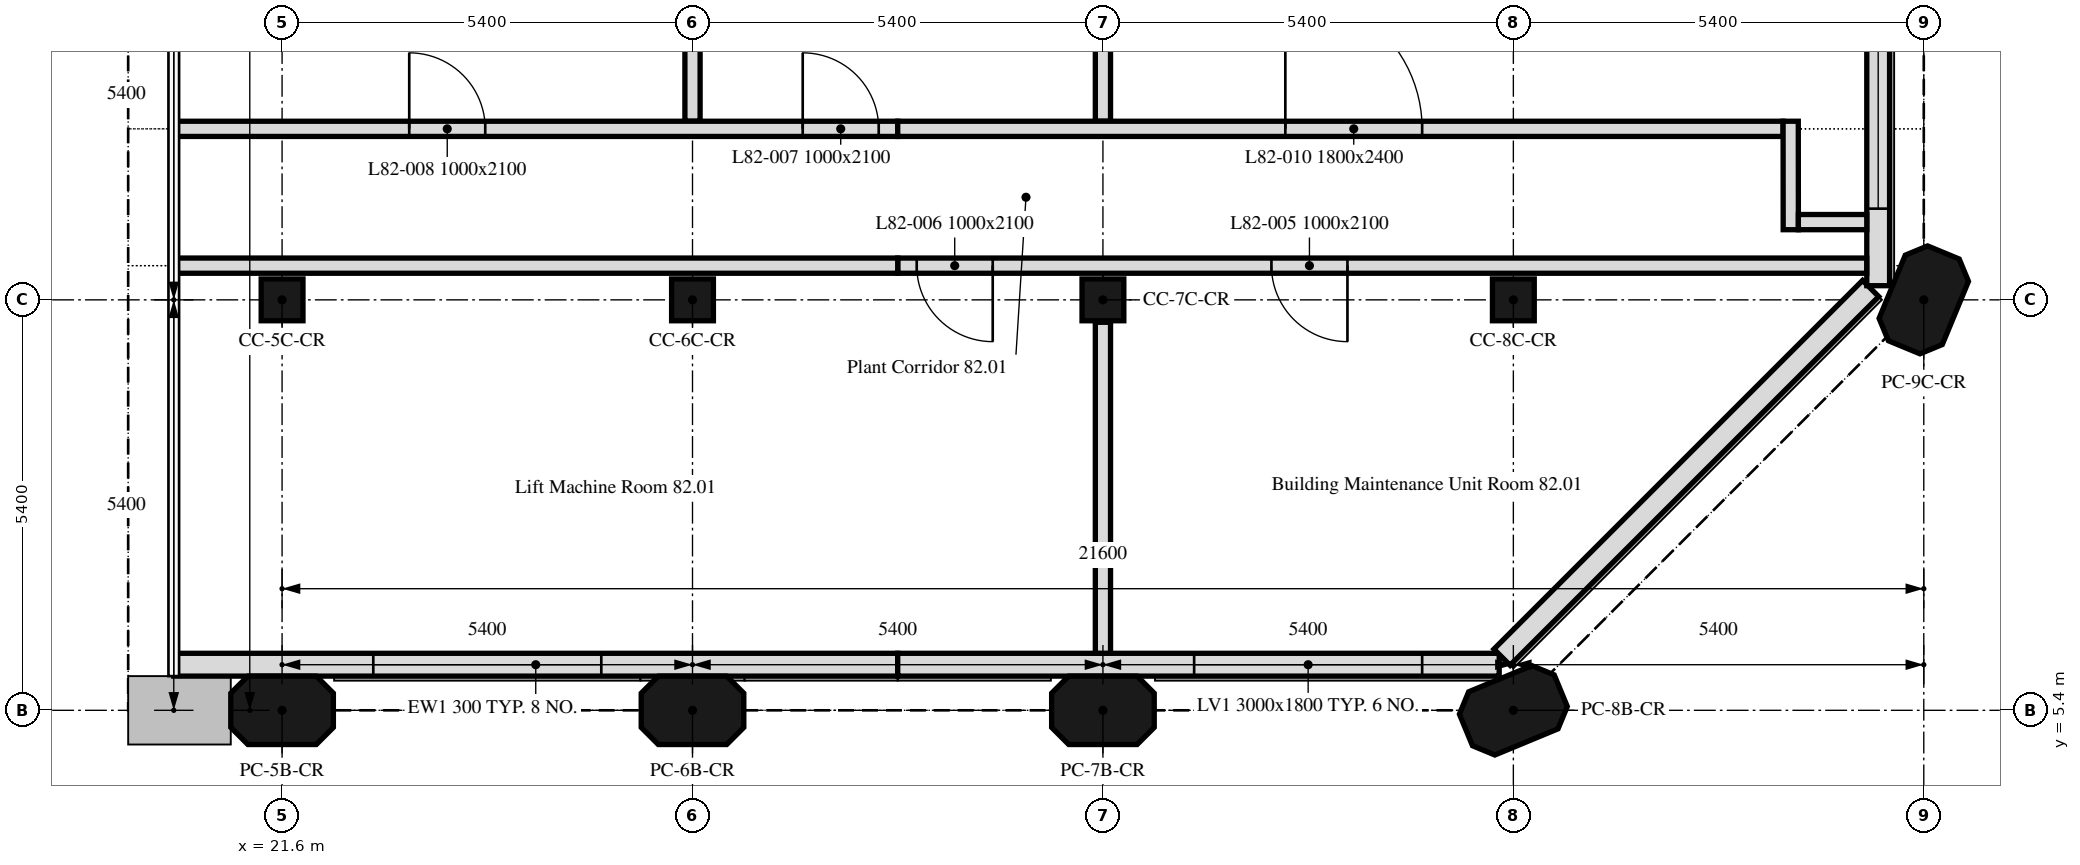
"""IFC4 building model, lengths in metres.
Left out: names, types, materials, properties, quantities, classifications, styles, units other than length and angle.
Written with IfcOpenShell. Run it as: python <this file> out.ifc"""

import sys

from ifc_helpers import new_model, si_unit, direction, frame, frame_2d, origin, origin_2d, place, context, subcontext, project, spatial, polyline, rectangle, outline, extrude, element, fill, save


model = new_model("IFC4")
c1 = context("Model", 3, precision=1e-05, world=origin(), true_north=direction((0.0, 1.0)))
c2 = subcontext(c1, "Body", "Model", "MODEL_VIEW")
j1 = project(units=[si_unit("LENGTHUNIT", "METRE"), si_unit("PLANEANGLEUNIT", "RADIAN")], contexts=[c1])
p1 = place(None, origin())
s1 = spatial("IfcSite", under=j1, at=p1, CompositionType="ELEMENT")
p2 = place(p1, origin())
s2 = spatial("IfcBuilding", under=s1, at=p2, CompositionType="ELEMENT")
p3 = place(p2, frame((0.0, 0.0, 330.7)))
s3 = spatial("IfcBuildingStorey", under=s2, at=p3, CompositionType="ELEMENT", Elevation=330.7)
p4 = place(p3, frame((21.6, 5.4, 0.0), z_axis=(0.0, 0.0, 1.0), x_axis=(1.0, 0.0, 0.0)))
e1 = element("IfcColumn", 1, at=p4, inside=s3, PredefinedType="COLUMN", context=c2, shape_type="SweptSolid", body=[
    extrude(outline(polyline([(-0.45, -0.45), (0.45, -0.45), (0.675, -0.225), (0.675, 0.225), (0.45, 0.45), (-0.45, 0.45), (-0.675, 0.225), (-0.675, -0.225), (-0.45, -0.45)])), origin(), (0.0, 0.0, 1.0), 3.6),
])
for number, where, z_axis, x_axis in (
    (2, (27.0, 5.4, 0.0), (0.0, 0.0, 1.0), (1.0, 0.0, 0.0)),
    (3, (32.4, 5.4, 0.0), (0.0, 0.0, 1.0), (1.0, 0.0, 0.0)),
    (4, (37.8, 5.4, 0.0), (0.0, 0.0, 1.0), (0.924, 0.383, 0.0)),
):
    element("IfcColumn", number, at=place(p3, frame(where, z_axis=z_axis, x_axis=x_axis)), inside=s3, PredefinedType="COLUMN", context=c2, shape_type="SweptSolid", body=[
        extrude(outline(polyline([(-0.45, -0.45), (0.45, -0.45), (0.675, -0.225), (0.675, 0.225), (0.45, 0.45), (-0.45, 0.45), (-0.675, 0.225), (-0.675, -0.225), (-0.45, -0.45)])), origin(), (0.0, 0.0, 1.0), 4.2),
    ])
p5 = place(p3, frame((21.6, 10.8, 0.0), z_axis=(0.0, 0.0, 1.0), x_axis=(1.0, 0.0, 0.0)))
e5 = element("IfcColumn", 5, at=p5, inside=s3, PredefinedType="COLUMN", context=c2, shape_type="SweptSolid", body=[
    extrude(rectangle(XDim=0.55, YDim=0.55, at=origin_2d()), origin(), (0.0, 0.0, 1.0), 3.6),
])
for number, where, z_axis, x_axis in (
    (6, (27.0, 10.8, 0.0), (0.0, 0.0, 1.0), (1.0, 0.0, 0.0)),
    (7, (32.4, 10.8, 0.0), (0.0, 0.0, 1.0), (1.0, 0.0, 0.0)),
    (8, (37.8, 10.8, 0.0), (0.0, 0.0, 1.0), (1.0, 0.0, 0.0)),
):
    element("IfcColumn", number, at=place(p3, frame(where, z_axis=z_axis, x_axis=x_axis)), inside=s3, PredefinedType="COLUMN", context=c2, shape_type="SweptSolid", body=[
        extrude(rectangle(XDim=0.55, YDim=0.55, at=origin_2d()), origin(), (0.0, 0.0, 1.0), 4.2),
    ])
p6 = place(p3, frame((43.2, 10.8, 0.0), z_axis=(0.0, 0.0, 1.0), x_axis=(0.382683432365, 0.923879532511, 0.0)))
e9 = element("IfcColumn", 9, at=p6, inside=s3, PredefinedType="COLUMN", context=c2, shape_type="SweptSolid", body=[
    extrude(outline(polyline([(-0.45, -0.45), (0.45, -0.45), (0.675, -0.225), (0.675, 0.225), (0.45, 0.45), (-0.45, 0.45), (-0.675, 0.225), (-0.675, -0.225), (-0.45, -0.45)])), origin(), (0.0, 0.0, 1.0), 4.2),
])
p7 = place(p3, frame((20.175, 6.0, 0.0), z_axis=(0.0, 0.0, 1.0), x_axis=(1.0, 0.0, 0.0)))
e10 = element("IfcWall", 10, at=p7, inside=s3, PredefinedType="SOLIDWALL", context=c2, shape_type="SweptSolid", body=[
    extrude(outline(polyline([(0.0, 0.0), (9.525, 0.0), (9.525, 4.2), (8.93, 6.936), (8.334, 6.671), (7.739, 6.406), (7.144, 6.142), (6.548, 5.877), (5.953, 5.613), (5.358, 5.348), (4.762, 5.083), (4.167, 4.819), (3.572, 4.554), (2.977, 4.29), (2.381, 4.025), (1.786, 3.76), (1.191, 3.496), (0.595, 3.231), (0.0, 2.967), (0.0, 0.0)])), frame((0.0, 0.15, 0.0), z_axis=(0.0, -1.0, 0.0), x_axis=(1.0, 0.0, 0.0)), (0.0, 0.0, 1.0), 0.3),
])
p8 = place(p7, frame((2.625, 0.0, 0.6)))
e11 = element("IfcOpeningElement", 11, at=p8, cuts=e10, PredefinedType="OPENING", context=c2, shape_type="SweptSolid", body=[
    extrude(rectangle(XDim=3.0, YDim=1.8, at=frame_2d((1.5, 0.9))), frame((0.0, 0.16, 0.0), z_axis=(0.0, -1.0, 0.0), x_axis=(1.0, 0.0, 0.0)), (0.0, 0.0, 1.0), 0.32),
])
p9 = place(p3, frame((29.7, 6.0, 0.0), z_axis=(0.0, 0.0, 1.0), x_axis=(1.0, 0.0, 0.0)))
e12 = element("IfcWall", 12, at=p9, inside=s3, PredefinedType="SOLIDWALL", context=c2, shape_type="SweptSolid", body=[
    extrude(outline(polyline([(0.0, 0.0), (7.914, 0.0), (7.914, 4.2), (7.348, 4.2), (6.783, 4.2), (6.218, 4.2), (5.653, 4.2), (5.087, 4.2), (4.522, 4.2), (3.957, 4.2), (3.392, 4.2), (2.826, 4.2), (2.261, 4.2), (1.696, 4.2), (1.131, 4.2), (0.565, 4.2), (0.0, 4.2), (0.0, 0.0)])), frame((0.0, 0.15, 0.0), z_axis=(0.0, -1.0, 0.0), x_axis=(1.0, 0.0, 0.0)), (0.0, 0.0, 1.0), 0.3),
])
p10 = place(p9, frame((3.9, 0.0, 0.6)))
e13 = element("IfcOpeningElement", 13, at=p10, cuts=e12, PredefinedType="OPENING", context=c2, shape_type="SweptSolid", body=[
    extrude(rectangle(XDim=3.0, YDim=1.8, at=frame_2d((1.5, 0.9))), frame((0.0, 0.16, 0.0), z_axis=(0.0, -1.0, 0.0), x_axis=(1.0, 0.0, 0.0)), (0.0, 0.0, 1.0), 0.32),
])
p11 = place(p3, frame((37.65, 6.099, 0.0), z_axis=(0.0, 0.0, 1.0), x_axis=(0.707106781187, 0.707106781187, 0.0)))
e14 = element("IfcWall", 14, at=p11, inside=s3, PredefinedType="SOLIDWALL", context=c2, shape_type="SweptSolid", body=[
    extrude(outline(polyline([(0.0, 0.0), (6.86, 0.0), (6.86, 4.2), (6.288, 4.2), (5.716, 4.2), (5.145, 4.2), (4.573, 4.2), (4.001, 4.2), (3.43, 4.2), (2.858, 4.2), (2.287, 4.2), (1.715, 4.2), (1.143, 4.2), (0.572, 4.2), (0.0, 4.2), (0.0, 0.0)])), frame((0.0, 0.15, 0.0), z_axis=(0.0, -1.0, 0.0), x_axis=(1.0, 0.0, 0.0)), (0.0, 0.0, 1.0), 0.3),
])
p12 = place(p3, frame((42.6, 10.986, 0.0), z_axis=(0.0, 0.0, 1.0), x_axis=(0.0, 1.0, 0.0)))
e15 = element("IfcWall", 15, at=p12, inside=s3, PredefinedType="SOLIDWALL", context=c2, shape_type="SweptSolid", body=[
    extrude(outline(polyline([(0.0, 0.0), (5.214, 0.0), (5.214, 4.2), (4.634, 4.2), (4.055, 4.2), (3.476, 4.2), (2.896, 4.2), (2.317, 4.2), (1.738, 4.2), (1.159, 4.2), (0.579, 4.2), (0.0, 4.2), (0.0, 0.0)])), frame((0.0, 0.15, 0.0), z_axis=(0.0, -1.0, 0.0), x_axis=(1.0, 0.0, 0.0)), (0.0, 0.0, 1.0), 0.3),
])
p13 = place(p12, frame((1.014, 0.0, 0.6)))
e16 = element("IfcOpeningElement", 16, at=p13, cuts=e15, PredefinedType="OPENING", context=c2, shape_type="SweptSolid", body=[
    extrude(rectangle(XDim=3.0, YDim=1.8, at=frame_2d((1.5, 0.9))), frame((0.0, 0.16, 0.0), z_axis=(0.0, -1.0, 0.0), x_axis=(1.0, 0.0, 0.0)), (0.0, 0.0, 1.0), 0.32),
])
p14 = place(p3, frame((32.4, 10.505, 0.0), z_axis=(0.0, 0.0, 1.0), x_axis=(0.0, -1.0, 0.0)))
e17 = element("IfcWall", 17, at=p14, inside=s3, PredefinedType="PARTITIONING", context=c2, shape_type="SweptSolid", body=[
    extrude(rectangle(XDim=4.354, YDim=0.2, at=frame_2d((2.177, 0.0))), origin(), (0.0, 0.0, 1.0), 4.2),
])
p15 = place(p3, frame((42.449, 11.25, 0.0), z_axis=(0.0, 0.0, 1.0), x_axis=(-1.0, 0.0, 0.0)))
e18 = element("IfcWall", 18, at=p15, inside=s3, PredefinedType="PARTITIONING", context=c2, shape_type="SweptSolid", body=[
    extrude(rectangle(XDim=12.749, YDim=0.2, at=frame_2d((6.375, 0.0))), origin(), (0.0, 0.0, 1.0), 4.2),
])
p16 = place(p15, frame((6.832, 0.0, 0.0)))
e19 = element("IfcOpeningElement", 19, at=p16, cuts=e18, PredefinedType="OPENING", context=c2, shape_type="SweptSolid", body=[
    extrude(rectangle(XDim=1.0, YDim=2.1, at=frame_2d((0.5, 1.05))), frame((0.0, 0.1, 0.0), z_axis=(0.0, -1.0, 0.0), x_axis=(1.0, 0.0, 0.0)), (0.0, 0.0, 1.0), 0.2),
])
p17 = place(p15, frame((11.499, 0.0, 0.0)))
e20 = element("IfcOpeningElement", 20, at=p17, cuts=e18, PredefinedType="OPENING", context=c2, shape_type="SweptSolid", body=[
    extrude(rectangle(XDim=1.0, YDim=2.1, at=frame_2d((0.5, 1.05))), frame((0.0, 0.1, 0.0), z_axis=(0.0, -1.0, 0.0), x_axis=(1.0, 0.0, 0.0)), (0.0, 0.0, 1.0), 0.2),
])
p18 = place(p3, frame((29.7, 11.25, 0.0), z_axis=(0.0, 0.0, 1.0), x_axis=(-1.0, 0.0, 0.0)))
e21 = element("IfcWall", 21, at=p18, inside=s3, PredefinedType="PARTITIONING", context=c2, shape_type="SweptSolid", body=[
    extrude(outline(polyline([(0.0, 0.0), (9.525, 0.0), (9.525, 2.967), (0.0, 4.2), (0.0, 0.0)])), frame((0.0, 0.1, 0.0), z_axis=(0.0, -1.0, 0.0), x_axis=(1.0, 0.0, 0.0)), (0.0, 0.0, 1.0), 0.2),
])
p19 = place(p3, frame((27.0, 15.83, 0.0), z_axis=(0.0, 0.0, 1.0), x_axis=(0.0, -1.0, 0.0)))
e22 = element("IfcWall", 22, at=p19, inside=s3, PredefinedType="PARTITIONING", context=c2, shape_type="SweptSolid", body=[
    extrude(rectangle(XDim=2.68, YDim=0.2, at=frame_2d((1.34, 0.0))), origin(), (0.0, 0.0, 1.0), 6.0),
])
p20 = place(p3, frame((32.4, 13.15, 0.0), z_axis=(0.0, 0.0, 1.0), x_axis=(0.0, 1.0, 0.0)))
e23 = element("IfcWall", 23, at=p20, inside=s3, PredefinedType="PARTITIONING", context=c2, shape_type="SweptSolid", body=[
    extrude(rectangle(XDim=3.05, YDim=0.2, at=frame_2d((1.525, 0.0))), origin(), (0.0, 0.0, 1.0), 4.2),
])
p21 = place(p3, frame((20.175, 13.05, 0.0), z_axis=(0.0, 0.0, 1.0), x_axis=(1.0, 0.0, 0.0)))
e24 = element("IfcWall", 24, at=p21, inside=s3, PredefinedType="PARTITIONING", context=c2, shape_type="SweptSolid", body=[
    extrude(outline(polyline([(0.0, 0.0), (9.525, 0.0), (9.525, 4.2), (0.0, 2.967), (0.0, 0.0)])), frame((0.0, 0.1, 0.0), z_axis=(0.0, -1.0, 0.0), x_axis=(1.0, 0.0, 0.0)), (0.0, 0.0, 1.0), 0.2),
])
p22 = place(p21, frame((8.275, 0.0, 0.0)))
e25 = element("IfcOpeningElement", 25, at=p22, cuts=e24, PredefinedType="OPENING", context=c2, shape_type="SweptSolid", body=[
    extrude(rectangle(XDim=1.0, YDim=2.1, at=frame_2d((0.5, 1.05))), frame((0.0, 0.1, 0.0), z_axis=(0.0, -1.0, 0.0), x_axis=(1.0, 0.0, 0.0)), (0.0, 0.0, 1.0), 0.2),
])
p23 = place(p21, frame((3.098, 0.0, 0.0)))
e26 = element("IfcOpeningElement", 26, at=p23, cuts=e24, PredefinedType="OPENING", context=c2, shape_type="SweptSolid", body=[
    extrude(rectangle(XDim=1.0, YDim=2.1, at=frame_2d((0.5, 1.05))), frame((0.0, 0.1, 0.0), z_axis=(0.0, -1.0, 0.0), x_axis=(1.0, 0.0, 0.0)), (0.0, 0.0, 1.0), 0.2),
])
p24 = place(p3, frame((29.7, 13.05, 0.0), z_axis=(0.0, 0.0, 1.0), x_axis=(1.0, 0.0, 0.0)))
e27 = element("IfcWall", 27, at=p24, inside=s3, PredefinedType="PARTITIONING", context=c2, shape_type="SweptSolid", body=[
    extrude(rectangle(XDim=11.649, YDim=0.2, at=frame_2d((5.825, 0.0))), origin(), (0.0, 0.0, 1.0), 4.2),
])
p25 = place(p24, frame((5.1, 0.0, 0.0)))
e28 = element("IfcOpeningElement", 28, at=p25, cuts=e27, PredefinedType="OPENING", context=c2, shape_type="SweptSolid", body=[
    extrude(rectangle(XDim=1.8, YDim=2.4, at=frame_2d((0.9, 1.2))), frame((0.0, 0.1, 0.0), z_axis=(0.0, -1.0, 0.0), x_axis=(1.0, 0.0, 0.0)), (0.0, 0.0, 1.0), 0.2),
])
p26 = place(p3, frame((41.449, 13.15, 0.0), z_axis=(0.0, 0.0, 1.0), x_axis=(0.00085543168, -0.999999634118, 0.0)))
e29 = element("IfcWall", 29, at=p26, inside=s3, PredefinedType="PARTITIONING", context=c2, shape_type="SweptSolid", body=[
    extrude(rectangle(XDim=1.427, YDim=0.2, at=frame_2d((0.713, 0.0))), origin(), (0.0, 0.0, 1.0), 4.2),
])
p27 = place(p3, frame((41.55, 11.823, 0.0), z_axis=(0.0, 0.0, 1.0), x_axis=(1.0, 0.0, 0.0)))
e30 = element("IfcWall", 30, at=p27, inside=s3, PredefinedType="PARTITIONING", context=c2, shape_type="SweptSolid", body=[
    extrude(rectangle(XDim=0.9, YDim=0.2, at=frame_2d((0.45, 0.0))), origin(), (0.0, 0.0, 1.0), 4.2),
])
p28 = place(p8, origin())
e31 = element("IfcWindow", 31, at=p28, inside=s3, PartitioningType="SINGLE_PANEL", PredefinedType="WINDOW", context=c2, shape_type="SweptSolid", body=[
    extrude(rectangle(XDim=3.0, YDim=1.8, at=frame_2d((1.5, 0.9))), frame((0.0, 0.03, 0.0), z_axis=(0.0, -1.0, 0.0), x_axis=(1.0, 0.0, 0.0)), (0.0, 0.0, 1.0), 0.06),
])
fill(e11, e31)
p29 = place(p10, origin())
e32 = element("IfcWindow", 32, at=p29, inside=s3, PartitioningType="SINGLE_PANEL", PredefinedType="WINDOW", context=c2, shape_type="SweptSolid", body=[
    extrude(rectangle(XDim=3.0, YDim=1.8, at=frame_2d((1.5, 0.9))), frame((0.0, 0.03, 0.0), z_axis=(0.0, -1.0, 0.0), x_axis=(1.0, 0.0, 0.0)), (0.0, 0.0, 1.0), 0.06),
])
fill(e13, e32)
p30 = place(p13, origin())
e33 = element("IfcWindow", 33, at=p30, inside=s3, PartitioningType="SINGLE_PANEL", PredefinedType="WINDOW", context=c2, shape_type="SweptSolid", body=[
    extrude(rectangle(XDim=3.0, YDim=1.8, at=frame_2d((1.5, 0.9))), frame((0.0, 0.03, 0.0), z_axis=(0.0, -1.0, 0.0), x_axis=(1.0, 0.0, 0.0)), (0.0, 0.0, 1.0), 0.06),
])
fill(e16, e33)
p31 = place(p16, origin())
e34 = element("IfcDoor", 34, at=p31, inside=s3, OperationType="SINGLE_SWING_RIGHT", PredefinedType="DOOR", context=c2, shape_type="SweptSolid", body=[
    extrude(rectangle(XDim=1.0, YDim=2.1, at=frame_2d((0.5, 1.05))), frame((0.0, 0.025, 0.0), z_axis=(0.0, -1.0, 0.0), x_axis=(1.0, 0.0, 0.0)), (0.0, 0.0, 1.0), 0.05),
])
fill(e19, e34)
p32 = place(p17, origin())
e35 = element("IfcDoor", 35, at=p32, inside=s3, OperationType="SINGLE_SWING_LEFT", PredefinedType="DOOR", context=c2, shape_type="SweptSolid", body=[
    extrude(rectangle(XDim=1.0, YDim=2.1, at=frame_2d((0.5, 1.05))), frame((0.0, 0.025, 0.0), z_axis=(0.0, -1.0, 0.0), x_axis=(1.0, 0.0, 0.0)), (0.0, 0.0, 1.0), 0.05),
])
fill(e20, e35)
p33 = place(p22, origin())
e36 = element("IfcDoor", 36, at=p33, inside=s3, OperationType="SINGLE_SWING_RIGHT", PredefinedType="DOOR", context=c2, shape_type="SweptSolid", body=[
    extrude(rectangle(XDim=1.0, YDim=2.1, at=frame_2d((0.5, 1.05))), frame((0.0, 0.025, 0.0), z_axis=(0.0, -1.0, 0.0), x_axis=(1.0, 0.0, 0.0)), (0.0, 0.0, 1.0), 0.05),
])
fill(e25, e36)
p34 = place(p23, origin())
e37 = element("IfcDoor", 37, at=p34, inside=s3, OperationType="SINGLE_SWING_LEFT", PredefinedType="DOOR", context=c2, shape_type="SweptSolid", body=[
    extrude(rectangle(XDim=1.0, YDim=2.1, at=frame_2d((0.5, 1.05))), frame((0.0, 0.025, 0.0), z_axis=(0.0, -1.0, 0.0), x_axis=(1.0, 0.0, 0.0)), (0.0, 0.0, 1.0), 0.05),
])
fill(e26, e37)
p35 = place(p25, origin())
e38 = element("IfcDoor", 38, at=p35, inside=s3, OperationType="DOUBLE_DOOR_SINGLE_SWING", PredefinedType="DOOR", context=c2, shape_type="SweptSolid", body=[
    extrude(rectangle(XDim=1.8, YDim=2.4, at=frame_2d((0.9, 1.2))), frame((0.0, 0.025, 0.0), z_axis=(0.0, -1.0, 0.0), x_axis=(1.0, 0.0, 0.0)), (0.0, 0.0, 1.0), 0.05),
])
fill(e28, e38)
save(model, sys.argv[1])
